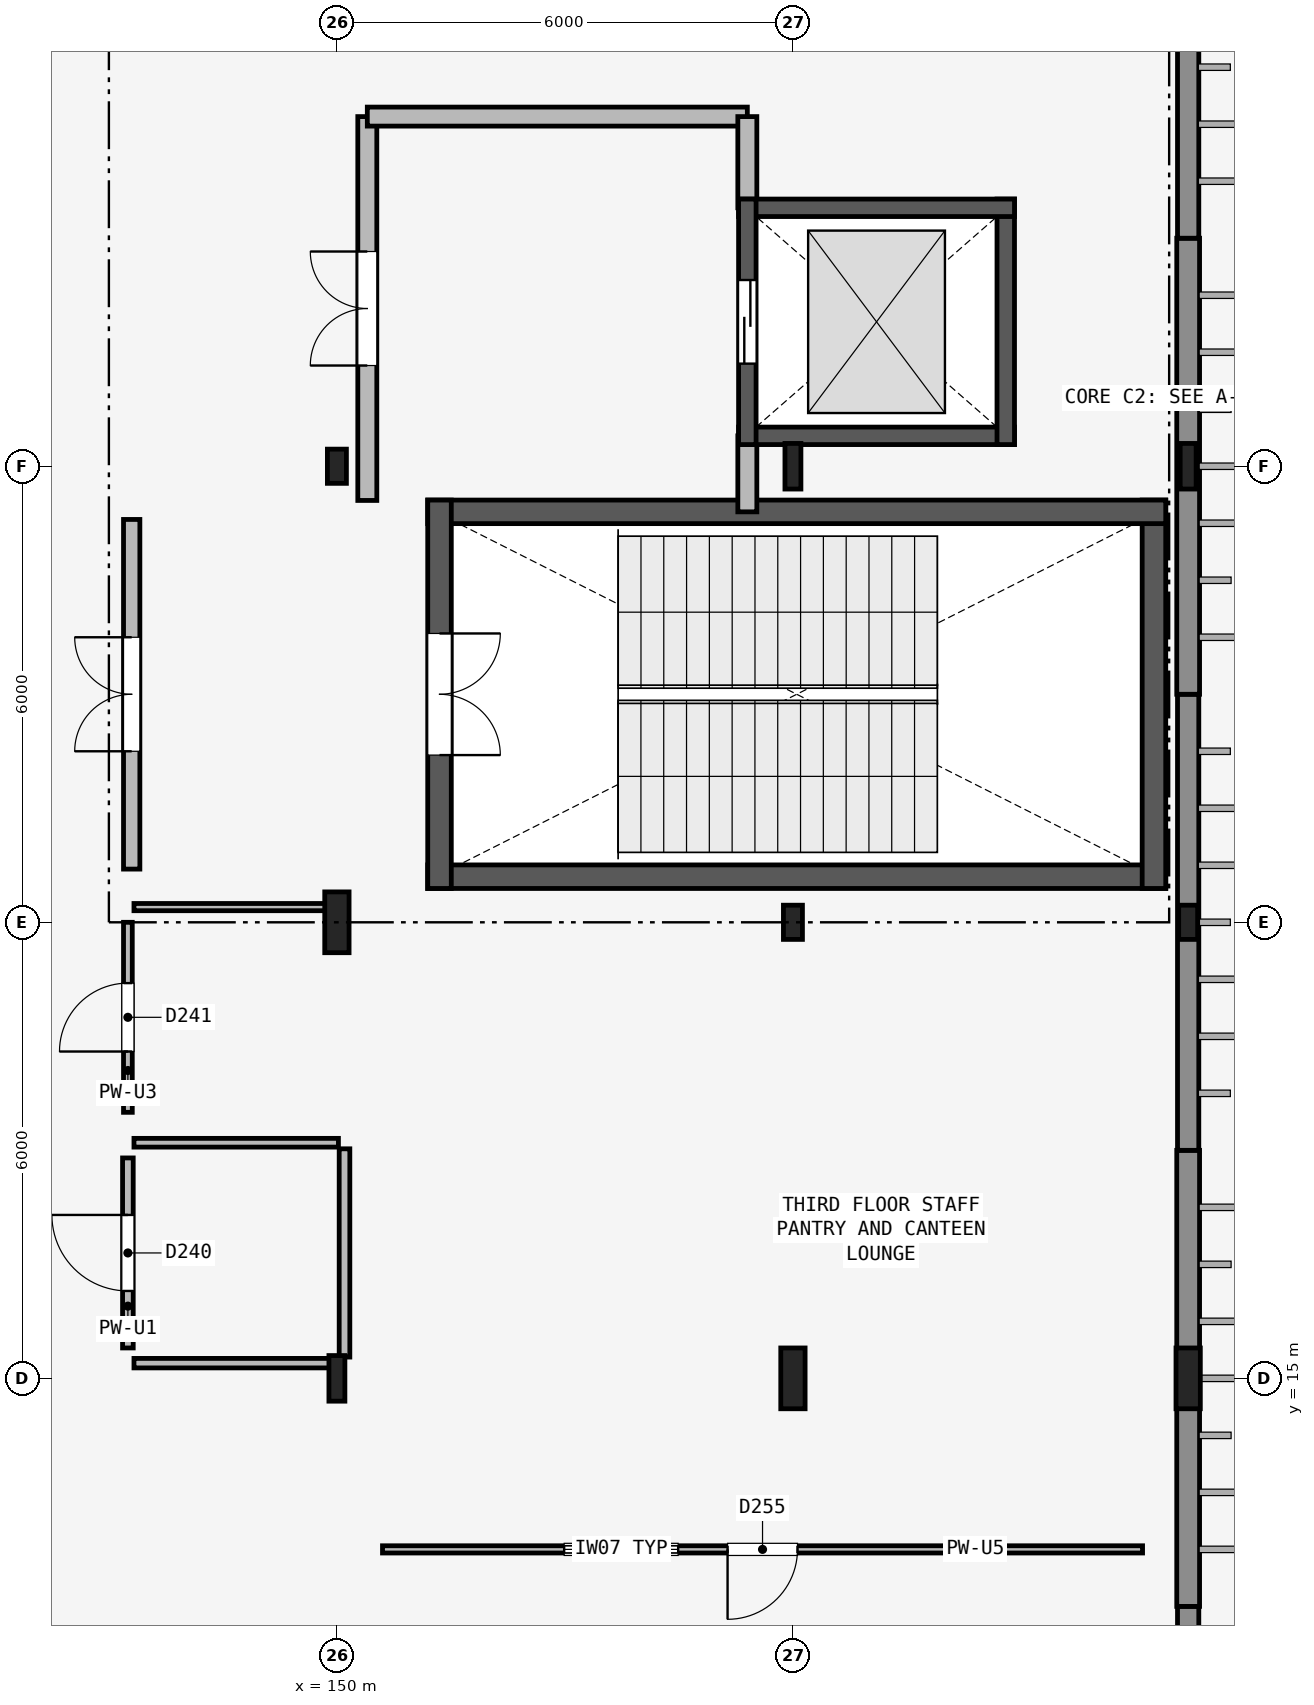
"""IFC4 building model, lengths in metres.
Left out: names, types, materials, properties, quantities, classifications, styles, units other than length and angle.
Written with IfcOpenShell. Run it as: python <this file> out.ifc"""

import sys

from ifc_helpers import new_model, si_unit, direction, frame, frame_2d, origin, origin_2d, place, context, subcontext, project, spatial, rectangle, i_section, extrude, element, fill, save


model = new_model("IFC4")
c1 = context("Model", 3, precision=1e-05, world=origin(), true_north=direction((0.0, 1.0)))
c2 = subcontext(c1, "Body", "Model", "MODEL_VIEW")
j1 = project(units=[si_unit("LENGTHUNIT", "METRE"), si_unit("PLANEANGLEUNIT", "RADIAN")], contexts=[c1])
p1 = place(None, origin())
s1 = spatial("IfcSite", under=j1, at=p1, CompositionType="ELEMENT")
p2 = place(p1, origin())
s2 = spatial("IfcBuilding", under=s1, at=p2, CompositionType="ELEMENT")
p3 = place(p2, frame((0.0, 0.0, 13.5)))
s3 = spatial("IfcBuildingStorey", under=s2, at=p3, CompositionType="ELEMENT", Elevation=13.5)
p4 = place(p3, frame((150.0, 15.0, 0.0), z_axis=(0.0, 0.0, 1.0), x_axis=(1.0, 0.0, 0.0)))
e1 = element("IfcColumn", 1, at=p4, inside=s3, PredefinedType="COLUMN", context=c2, shape_type="SweptSolid", body=[
    extrude(i_section(OverallWidth=0.21, OverallDepth=0.6, WebThickness=0.012, FlangeThickness=0.021, FilletRadius=0.02, at=origin_2d()), origin(), (0.0, 0.0, 1.0), 4.5),
])
p5 = place(p3, frame((150.0, 21.0, 0.0), z_axis=(0.0, 0.0, 1.0), x_axis=(1.0, 0.0, 0.0)))
e2 = element("IfcColumn", 2, at=p5, inside=s3, PredefinedType="COLUMN", context=c2, shape_type="SweptSolid", body=[
    extrude(i_section(OverallWidth=0.32, OverallDepth=0.8, WebThickness=0.016, FlangeThickness=0.028, at=origin_2d()), origin(), (0.0, 0.0, 1.0), 4.5),
])
p6 = place(p3, frame((150.0, 27.0, 0.0), z_axis=(0.0, 0.0, 1.0), x_axis=(1.0, 0.0, 0.0)))
e3 = element("IfcColumn", 3, at=p6, inside=s3, PredefinedType="COLUMN", context=c2, shape_type="SweptSolid", body=[
    extrude(i_section(OverallWidth=0.25, OverallDepth=0.45, WebThickness=0.011, FlangeThickness=0.014, FilletRadius=0.015, at=origin_2d()), origin(), (0.0, 0.0, 1.0), 4.5),
])
p7 = place(p3, frame((156.0, 15.0, 0.0), z_axis=(0.0, 0.0, 1.0), x_axis=(1.0, 0.0, 0.0)))
e4 = element("IfcColumn", 4, at=p7, inside=s3, PredefinedType="COLUMN", context=c2, shape_type="SweptSolid", body=[
    extrude(i_section(OverallWidth=0.32, OverallDepth=0.8, WebThickness=0.016, FlangeThickness=0.028, at=origin_2d()), origin(), (0.0, 0.0, 1.0), 4.5),
])
p8 = place(p3, frame((156.0, 21.0, 0.0), z_axis=(0.0, 0.0, 1.0), x_axis=(1.0, 0.0, 0.0)))
e5 = element("IfcColumn", 5, at=p8, inside=s3, PredefinedType="COLUMN", context=c2, shape_type="SweptSolid", body=[
    extrude(i_section(OverallWidth=0.25, OverallDepth=0.45, WebThickness=0.011, FlangeThickness=0.014, FilletRadius=0.015, at=origin_2d()), origin(), (0.0, 0.0, 1.0), 4.5),
])
p9 = place(p3, frame((156.0, 27.0, 0.0), z_axis=(0.0, 0.0, 1.0), x_axis=(1.0, 0.0, 0.0)))
e6 = element("IfcColumn", 6, at=p9, inside=s3, PredefinedType="COLUMN", context=c2, shape_type="SweptSolid", body=[
    extrude(i_section(OverallWidth=0.21, OverallDepth=0.6, WebThickness=0.012, FlangeThickness=0.021, FilletRadius=0.02, at=origin_2d()), origin(), (0.0, 0.0, 1.0), 4.5),
])
p10 = place(p3, frame((161.2, 15.0, 0.0), z_axis=(0.0, 0.0, 1.0), x_axis=(1.0, 0.0, 0.0)))
e7 = element("IfcColumn", 7, at=p10, inside=s3, PredefinedType="COLUMN", context=c2, shape_type="SweptSolid", body=[
    extrude(i_section(OverallWidth=0.32, OverallDepth=0.8, WebThickness=0.016, FlangeThickness=0.028, at=origin_2d()), origin(), (0.0, 0.0, 1.0), 4.5),
])
p11 = place(p3, frame((161.2, 21.0, 0.0), z_axis=(0.0, 0.0, 1.0), x_axis=(1.0, 0.0, 0.0)))
e8 = element("IfcColumn", 8, at=p11, inside=s3, PredefinedType="COLUMN", context=c2, shape_type="SweptSolid", body=[
    extrude(i_section(OverallWidth=0.25, OverallDepth=0.45, WebThickness=0.011, FlangeThickness=0.014, FilletRadius=0.015, at=origin_2d()), origin(), (0.0, 0.0, 1.0), 4.5),
])
p12 = place(p3, frame((161.2, 27.0, 0.0), z_axis=(0.0, 0.0, 1.0), x_axis=(1.0, 0.0, 0.0)))
e9 = element("IfcColumn", 9, at=p12, inside=s3, PredefinedType="COLUMN", context=c2, shape_type="SweptSolid", body=[
    extrude(i_section(OverallWidth=0.21, OverallDepth=0.6, WebThickness=0.012, FlangeThickness=0.021, FilletRadius=0.02, at=origin_2d()), origin(), (0.0, 0.0, 1.0), 4.5),
])
p13 = place(p3, frame((161.2, 6.0, 0.0), z_axis=(0.0, 0.0, 1.0), x_axis=(0.0, 1.0, 0.0)))
e10 = element("IfcWall", 10, at=p13, inside=s3, PredefinedType="SOLIDWALL", context=c2, shape_type="SweptSolid", body=[
    extrude(rectangle(XDim=6.0, YDim=0.28, at=frame_2d((3.0, 0.0))), origin(), (0.0, 0.0, 1.0), 3.59),
])
p14 = place(p3, frame((161.2, 12.0, 0.0), z_axis=(0.0, 0.0, 1.0), x_axis=(0.0, 1.0, 0.0)))
e11 = element("IfcWall", 11, at=p14, inside=s3, PredefinedType="SOLIDWALL", context=c2, shape_type="SweptSolid", body=[
    extrude(rectangle(XDim=6.0, YDim=0.3, at=frame_2d((3.0, 0.0))), origin(), (0.0, 0.0, 1.0), 3.59),
])
p15 = place(p3, frame((161.2, 18.0, 0.0), z_axis=(0.0, 0.0, 1.0), x_axis=(0.0, 1.0, 0.0)))
e12 = element("IfcWall", 12, at=p15, inside=s3, PredefinedType="SOLIDWALL", context=c2, shape_type="SweptSolid", body=[
    extrude(rectangle(XDim=6.0, YDim=0.28, at=frame_2d((3.0, 0.0))), origin(), (0.0, 0.0, 1.0), 3.59),
])
p16 = place(p3, frame((161.2, 24.0, 0.0), z_axis=(0.0, 0.0, 1.0), x_axis=(0.0, 1.0, 0.0)))
e13 = element("IfcWall", 13, at=p16, inside=s3, PredefinedType="SOLIDWALL", context=c2, shape_type="SweptSolid", body=[
    extrude(rectangle(XDim=6.0, YDim=0.3, at=frame_2d((3.0, 0.0))), origin(), (0.0, 0.0, 1.0), 3.59),
])
p17 = place(p3, frame((161.2, 30.0, 0.0), z_axis=(0.0, 0.0, 1.0), x_axis=(0.0, 1.0, 0.0)))
e14 = element("IfcWall", 14, at=p17, inside=s3, PredefinedType="SOLIDWALL", context=c2, shape_type="SweptSolid", body=[
    extrude(rectangle(XDim=6.0, YDim=0.28, at=frame_2d((3.0, 0.0))), origin(), (0.0, 0.0, 1.0), 3.59),
])
p18 = place(p3, frame((151.195, 21.6, 0.0), z_axis=(0.0, 0.0, 1.0), x_axis=(1.0, 0.0, 0.0)))
e15 = element("IfcWall", 15, at=p18, inside=s3, PredefinedType="SHEAR", context=c2, shape_type="SweptSolid", body=[
    extrude(rectangle(XDim=9.71, YDim=0.31, at=frame_2d((4.855, 0.0))), origin(), (0.0, 0.0, 1.0), 4.36),
])
p19 = place(p3, frame((160.75, 21.445, 0.0), z_axis=(0.0, 0.0, 1.0), x_axis=(0.0, 1.0, 0.0)))
e16 = element("IfcWall", 16, at=p19, inside=s3, PredefinedType="SHEAR", context=c2, shape_type="SweptSolid", body=[
    extrude(rectangle(XDim=5.11, YDim=0.31, at=frame_2d((2.555, 0.0))), origin(), (0.0, 0.0, 1.0), 4.36),
])
p20 = place(p3, frame((160.905, 26.4, 0.0), z_axis=(0.0, 0.0, 1.0), x_axis=(-1.0, 0.0, 0.0)))
e17 = element("IfcWall", 17, at=p20, inside=s3, PredefinedType="SHEAR", context=c2, shape_type="SweptSolid", body=[
    extrude(rectangle(XDim=9.71, YDim=0.31, at=frame_2d((4.855, 0.0))), origin(), (0.0, 0.0, 1.0), 4.36),
])
p21 = place(p3, frame((151.35, 26.555, 0.0), z_axis=(0.0, 0.0, 1.0), x_axis=(0.0, -1.0, 0.0)))
e18 = element("IfcWall", 18, at=p21, inside=s3, PredefinedType="SHEAR", context=c2, shape_type="SweptSolid", body=[
    extrude(rectangle(XDim=5.11, YDim=0.31, at=frame_2d((2.555, 0.0))), origin(), (0.0, 0.0, 1.0), 4.36),
])
p22 = place(p21, frame((1.755, 0.0, 0.0)))
e19 = element("IfcOpeningElement", 19, at=p22, cuts=e18, PredefinedType="OPENING", context=c2, shape_type="SweptSolid", body=[
    extrude(rectangle(XDim=1.6, YDim=2.2, at=frame_2d((0.8, 1.1))), frame((0.0, 0.165, 0.0), z_axis=(0.0, -1.0, 0.0), x_axis=(1.0, 0.0, 0.0)), (0.0, 0.0, 1.0), 0.33),
])
p23 = place(p3, frame((147.3, 21.7, 0.0), z_axis=(0.0, 0.0, 1.0), x_axis=(0.0, 1.0, 0.0)))
e20 = element("IfcWall", 20, at=p23, inside=s3, PredefinedType="PARTITIONING", context=c2, shape_type="SweptSolid", body=[
    extrude(rectangle(XDim=4.6, YDim=0.215, at=frame_2d((2.3, 0.0))), origin(), (0.0, 0.0, 1.0), 4.19),
])
p24 = place(p23, frame((1.55, 0.0, 0.0)))
e21 = element("IfcOpeningElement", 21, at=p24, cuts=e20, PredefinedType="OPENING", context=c2, shape_type="SweptSolid", body=[
    extrude(rectangle(XDim=1.5, YDim=2.15, at=frame_2d((0.75, 1.075))), frame((0.0, 0.117, 0.0), z_axis=(0.0, -1.0, 0.0), x_axis=(1.0, 0.0, 0.0)), (0.0, 0.0, 1.0), 0.235),
])
p25 = place(p3, frame((150.4, 26.55, 0.0), z_axis=(0.0, 0.0, 1.0), x_axis=(0.0, 1.0, 0.0)))
e22 = element("IfcWall", 22, at=p25, inside=s3, PredefinedType="PARTITIONING", context=c2, shape_type="SweptSolid", body=[
    extrude(rectangle(XDim=5.05, YDim=0.25, at=frame_2d((2.525, 0.0))), origin(), (0.0, 0.0, 1.0), 3.79),
])
p26 = place(p25, frame((1.775, 0.0, 0.0)))
e23 = element("IfcOpeningElement", 23, at=p26, cuts=e22, PredefinedType="OPENING", context=c2, shape_type="SweptSolid", body=[
    extrude(rectangle(XDim=1.5, YDim=2.15, at=frame_2d((0.75, 1.075))), frame((0.0, 0.135, 0.0), z_axis=(0.0, -1.0, 0.0), x_axis=(1.0, 0.0, 0.0)), (0.0, 0.0, 1.0), 0.27),
])
p27 = place(p3, frame((150.4, 31.6, 0.0), z_axis=(0.0, 0.0, 1.0), x_axis=(1.0, 0.0, 0.0)))
e24 = element("IfcWall", 24, at=p27, inside=s3, PredefinedType="PARTITIONING", context=c2, shape_type="SweptSolid", body=[
    extrude(rectangle(XDim=5.0, YDim=0.25, at=frame_2d((2.5, 0.0))), origin(), (0.0, 0.0, 1.0), 3.79),
])
p28 = place(p3, frame((155.4, 30.4, 0.0), z_axis=(0.0, 0.0, 1.0), x_axis=(0.0, 1.0, 0.0)))
e25 = element("IfcWall", 25, at=p28, inside=s3, PredefinedType="PARTITIONING", context=c2, shape_type="SweptSolid", body=[
    extrude(rectangle(XDim=1.2, YDim=0.25, at=frame_2d((0.6, 0.0))), origin(), (0.0, 0.0, 1.0), 4.19),
])
p29 = place(p3, frame((155.4, 26.4, 0.0), z_axis=(0.0, 0.0, 1.0), x_axis=(0.0, 1.0, 0.0)))
e26 = element("IfcWall", 26, at=p29, inside=s3, PredefinedType="PARTITIONING", context=c2, shape_type="SweptSolid", body=[
    extrude(rectangle(XDim=1.0, YDim=0.25, at=frame_2d((0.5, 0.0))), origin(), (0.0, 0.0, 1.0), 3.79),
])
p30 = place(p3, frame((155.285, 27.4, 0.0), z_axis=(0.0, 0.0, 1.0), x_axis=(1.0, 0.0, 0.0)))
e27 = element("IfcWall", 27, at=p30, inside=s3, PredefinedType="SHEAR", context=c2, shape_type="SweptSolid", body=[
    extrude(rectangle(XDim=3.63, YDim=0.23, at=frame_2d((1.815, 0.0))), origin(), (0.0, 0.0, 1.0), 4.5),
])
p31 = place(p3, frame((158.8, 27.285, 0.0), z_axis=(0.0, 0.0, 1.0), x_axis=(0.0, 1.0, 0.0)))
e28 = element("IfcWall", 28, at=p31, inside=s3, PredefinedType="SHEAR", context=c2, shape_type="SweptSolid", body=[
    extrude(rectangle(XDim=3.23, YDim=0.23, at=frame_2d((1.615, 0.0))), origin(), (0.0, 0.0, 1.0), 4.5),
])
p32 = place(p3, frame((158.915, 30.4, 0.0), z_axis=(0.0, 0.0, 1.0), x_axis=(-1.0, 0.0, 0.0)))
e29 = element("IfcWall", 29, at=p32, inside=s3, PredefinedType="SHEAR", context=c2, shape_type="SweptSolid", body=[
    extrude(rectangle(XDim=3.63, YDim=0.23, at=frame_2d((1.815, 0.0))), origin(), (0.0, 0.0, 1.0), 4.5),
])
p33 = place(p3, frame((155.4, 30.515, 0.0), z_axis=(0.0, 0.0, 1.0), x_axis=(0.0, -1.0, 0.0)))
e30 = element("IfcWall", 30, at=p33, inside=s3, PredefinedType="SHEAR", context=c2, shape_type="SweptSolid", body=[
    extrude(rectangle(XDim=3.23, YDim=0.23, at=frame_2d((1.615, 0.0))), origin(), (0.0, 0.0, 1.0), 4.5),
])
p34 = place(p33, frame((1.065, 0.0, 0.0)))
e31 = element("IfcOpeningElement", 31, at=p34, cuts=e30, PredefinedType="OPENING", context=c2, shape_type="SweptSolid", body=[
    extrude(rectangle(XDim=1.1, YDim=2.2, at=frame_2d((0.55, 1.1))), frame((0.0, 0.125, 0.0), z_axis=(0.0, -1.0, 0.0), x_axis=(1.0, 0.0, 0.0)), (0.0, 0.0, 1.0), 0.25),
])
p35 = place(p3, frame((147.25, 15.4, 0.0), z_axis=(0.0, 0.0, 1.0), x_axis=(0.0, 1.0, 0.0)))
e32 = element("IfcWall", 32, at=p35, inside=s3, PredefinedType="PARTITIONING", context=c2, shape_type="SweptSolid", body=[
    extrude(rectangle(XDim=2.5, YDim=0.14, at=frame_2d((1.25, 0.0))), origin(), (0.0, 0.0, 1.0), 4.19),
])
p36 = place(p35, frame((0.75, 0.0, 0.0)))
e33 = element("IfcOpeningElement", 33, at=p36, cuts=e32, PredefinedType="OPENING", context=c2, shape_type="SweptSolid", body=[
    extrude(rectangle(XDim=1.0, YDim=2.1, at=frame_2d((0.5, 1.05))), frame((0.0, 0.08, 0.0), z_axis=(0.0, -1.0, 0.0), x_axis=(1.0, 0.0, 0.0)), (0.0, 0.0, 1.0), 0.16),
])
p37 = place(p3, frame((147.25, 18.5, 0.0), z_axis=(0.0, 0.0, 1.0), x_axis=(0.0, 1.0, 0.0)))
e34 = element("IfcWall", 34, at=p37, inside=s3, PredefinedType="PARTITIONING", context=c2, shape_type="SweptSolid", body=[
    extrude(rectangle(XDim=2.5, YDim=0.115, at=frame_2d((1.25, 0.0))), origin(), (0.0, 0.0, 1.0), 3.74),
])
p38 = place(p37, frame((0.8, 0.0, 0.0)))
e35 = element("IfcOpeningElement", 35, at=p38, cuts=e34, PredefinedType="OPENING", context=c2, shape_type="SweptSolid", body=[
    extrude(rectangle(XDim=0.9, YDim=2.1, at=frame_2d((0.45, 1.05))), frame((0.0, 0.067, 0.0), z_axis=(0.0, -1.0, 0.0), x_axis=(1.0, 0.0, 0.0)), (0.0, 0.0, 1.0), 0.135),
])
p39 = place(p3, frame((160.6, 12.75, 0.0), z_axis=(0.0, 0.0, 1.0), x_axis=(-1.0, 0.0, 0.0)))
e36 = element("IfcWall", 36, at=p39, inside=s3, PredefinedType="PARTITIONING", context=c2, shape_type="SweptSolid", body=[
    extrude(rectangle(XDim=10.0, YDim=0.095, at=frame_2d((5.0, 0.0))), origin(), (0.0, 0.0, 1.0), 3.69),
])
p40 = place(p39, frame((4.54, 0.0, 0.0)))
e37 = element("IfcOpeningElement", 37, at=p40, cuts=e36, PredefinedType="OPENING", context=c2, shape_type="SweptSolid", body=[
    extrude(rectangle(XDim=0.92, YDim=2.1, at=frame_2d((0.46, 1.05))), frame((0.0, 0.057, 0.0), z_axis=(0.0, -1.0, 0.0), x_axis=(1.0, 0.0, 0.0)), (0.0, 0.0, 1.0), 0.115),
])
p41 = place(p39, frame((6.11, 0.0, 1.0)))
e38 = element("IfcOpeningElement", 38, at=p41, cuts=e36, PredefinedType="OPENING", context=c2, shape_type="SweptSolid", body=[
    extrude(rectangle(XDim=1.5, YDim=1.2, at=frame_2d((0.75, 0.6))), frame((0.0, 0.057, 0.0), z_axis=(0.0, -1.0, 0.0), x_axis=(1.0, 0.0, 0.0)), (0.0, 0.0, 1.0), 0.115),
])
p42 = place(p3, frame((150.1, 18.02, 0.0), z_axis=(0.0, 0.0, 1.0), x_axis=(0.0, -1.0, 0.0)))
e39 = element("IfcWall", 39, at=p42, inside=s3, PredefinedType="PARTITIONING", context=c2, shape_type="SweptSolid", body=[
    extrude(rectangle(XDim=2.74, YDim=0.14, at=frame_2d((1.37, 0.0))), origin(), (0.0, 0.0, 1.0), 3.74),
])
p43 = place(p3, frame((150.02, 15.2, 0.0), z_axis=(0.0, 0.0, 1.0), x_axis=(-1.0, 0.0, 0.0)))
e40 = element("IfcWall", 40, at=p43, inside=s3, PredefinedType="PARTITIONING", context=c2, shape_type="SweptSolid", body=[
    extrude(rectangle(XDim=2.69, YDim=0.125, at=frame_2d((1.345, 0.0))), origin(), (0.0, 0.0, 1.0), 3.69),
])
p44 = place(p3, frame((147.33, 18.1, 0.0), z_axis=(0.0, 0.0, 1.0), x_axis=(1.0, 0.0, 0.0)))
e41 = element("IfcWall", 41, at=p44, inside=s3, PredefinedType="PARTITIONING", context=c2, shape_type="SweptSolid", body=[
    extrude(rectangle(XDim=2.69, YDim=0.115, at=frame_2d((1.345, 0.0))), origin(), (0.0, 0.0, 1.0), 3.74),
])
p45 = place(p3, frame((147.33, 21.2, 0.0), z_axis=(0.0, 0.0, 1.0), x_axis=(1.0, 0.0, 0.0)))
e42 = element("IfcWall", 42, at=p45, inside=s3, PredefinedType="PARTITIONING", context=c2, shape_type="SweptSolid", body=[
    extrude(rectangle(XDim=2.69, YDim=0.095, at=frame_2d((1.345, 0.0))), origin(), (0.0, 0.0, 1.0), 3.74),
])
p46 = place(p22, origin())
e43 = element("IfcDoor", 43, at=p46, inside=s3, OperationType="DOUBLE_DOOR_SINGLE_SWING", PredefinedType="DOOR", context=c2, shape_type="SweptSolid", body=[
    extrude(rectangle(XDim=1.6, YDim=2.2, at=frame_2d((0.8, 1.1))), frame((0.0, 0.025, 0.0), z_axis=(0.0, -1.0, 0.0), x_axis=(1.0, 0.0, 0.0)), (0.0, 0.0, 1.0), 0.05),
])
fill(e19, e43)
p47 = place(p24, origin())
e44 = element("IfcDoor", 44, at=p47, inside=s3, OperationType="DOUBLE_DOOR_SINGLE_SWING", PredefinedType="DOOR", context=c2, shape_type="SweptSolid", body=[
    extrude(rectangle(XDim=1.5, YDim=2.15, at=frame_2d((0.75, 1.075))), frame((0.0, 0.025, 0.0), z_axis=(0.0, -1.0, 0.0), x_axis=(1.0, 0.0, 0.0)), (0.0, 0.0, 1.0), 0.05),
])
fill(e21, e44)
p48 = place(p26, origin())
e45 = element("IfcDoor", 45, at=p48, inside=s3, OperationType="DOUBLE_DOOR_SINGLE_SWING", PredefinedType="DOOR", context=c2, shape_type="SweptSolid", body=[
    extrude(rectangle(XDim=1.5, YDim=2.15, at=frame_2d((0.75, 1.075))), frame((0.0, 0.025, 0.0), z_axis=(0.0, -1.0, 0.0), x_axis=(1.0, 0.0, 0.0)), (0.0, 0.0, 1.0), 0.05),
])
fill(e23, e45)
p49 = place(p34, origin())
e46 = element("IfcDoor", 46, at=p49, inside=s3, OperationType="SLIDING_TO_LEFT", PredefinedType="DOOR", context=c2, shape_type="SweptSolid", body=[
    extrude(rectangle(XDim=1.1, YDim=2.2, at=frame_2d((0.55, 1.1))), frame((0.0, 0.025, 0.0), z_axis=(0.0, -1.0, 0.0), x_axis=(1.0, 0.0, 0.0)), (0.0, 0.0, 1.0), 0.05),
])
fill(e31, e46)
p50 = place(p36, origin())
e47 = element("IfcDoor", 47, at=p50, inside=s3, OperationType="SINGLE_SWING_RIGHT", PredefinedType="DOOR", context=c2, shape_type="SweptSolid", body=[
    extrude(rectangle(XDim=1.0, YDim=2.1, at=frame_2d((0.5, 1.05))), frame((0.0, 0.025, 0.0), z_axis=(0.0, -1.0, 0.0), x_axis=(1.0, 0.0, 0.0)), (0.0, 0.0, 1.0), 0.05),
])
fill(e33, e47)
p51 = place(p38, origin())
e48 = element("IfcDoor", 48, at=p51, inside=s3, OperationType="SINGLE_SWING_LEFT", PredefinedType="DOOR", context=c2, shape_type="SweptSolid", body=[
    extrude(rectangle(XDim=0.9, YDim=2.1, at=frame_2d((0.45, 1.05))), frame((0.0, 0.025, 0.0), z_axis=(0.0, -1.0, 0.0), x_axis=(1.0, 0.0, 0.0)), (0.0, 0.0, 1.0), 0.05),
])
fill(e35, e48)
p52 = place(p40, origin())
e49 = element("IfcDoor", 49, at=p52, inside=s3, OperationType="SINGLE_SWING_RIGHT", PredefinedType="DOOR", context=c2, shape_type="SweptSolid", body=[
    extrude(rectangle(XDim=0.92, YDim=2.1, at=frame_2d((0.46, 1.05))), frame((0.0, 0.025, 0.0), z_axis=(0.0, -1.0, 0.0), x_axis=(1.0, 0.0, 0.0)), (0.0, 0.0, 1.0), 0.05),
])
fill(e37, e49)
p53 = place(p41, origin())
e50 = element("IfcWindow", 50, at=p53, inside=s3, PartitioningType="SINGLE_PANEL", PredefinedType="WINDOW", context=c2, shape_type="SweptSolid", body=[
    extrude(rectangle(XDim=1.5, YDim=1.2, at=frame_2d((0.75, 0.6))), frame((0.0, 0.03, 0.0), z_axis=(0.0, -1.0, 0.0), x_axis=(1.0, 0.0, 0.0)), (0.0, 0.0, 1.0), 0.06),
])
fill(e38, e50)
save(model, sys.argv[1])
